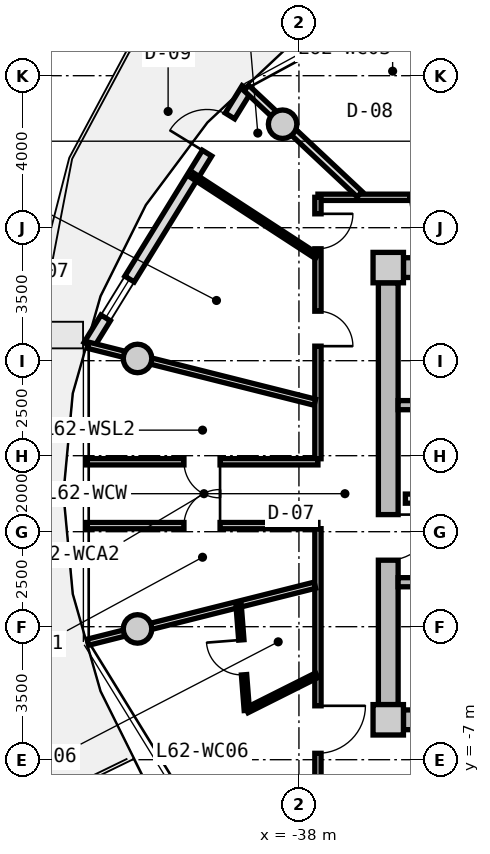
"""IFC4 building model, lengths in metres.
Left out: names, types, materials, properties, quantities, classifications, styles, units other than length and angle.
Written with IfcOpenShell. Run it as: python <this file> out.ifc"""

import sys

from ifc_helpers import new_model, si_unit, direction, frame, frame_2d, origin, origin_2d, place, context, subcontext, project, spatial, rectangle, circle, extrude, source, transform, mapped, element, fill, save


model = new_model("IFC4")
c1 = context("Model", 3, precision=1e-05, world=origin(), true_north=direction((0.0, 1.0)))
c2 = subcontext(c1, "Body", "Model", "MODEL_VIEW")
j1 = project(units=[si_unit("LENGTHUNIT", "METRE"), si_unit("PLANEANGLEUNIT", "RADIAN")], contexts=[c1])
p1 = place(None, origin())
s1 = spatial("IfcSite", under=j1, at=p1, CompositionType="ELEMENT")
p2 = place(p1, origin())
s2 = spatial("IfcBuilding", under=s1, at=p2, CompositionType="ELEMENT")
p3 = place(p2, frame((0.0, 0.0, 199.8)))
s3 = spatial("IfcBuildingStorey", under=s2, at=p3, CompositionType="ELEMENT", Elevation=199.8)
m1 = source(origin(), c2, "Body", "SweptSolid", [
    extrude(rectangle(XDim=0.8, YDim=0.8, at=origin_2d()), origin(), (0.0, 0.0, 1.0), 4.0),
])
for number, where, z_axis, x_axis in (
    (1, (-35.65, -5.95, 0.0), (0.0, 0.0, 1.0), (1.0, 0.0, 0.0)),
    (2, (-35.65, 5.95, 0.0), (0.0, 0.0, 1.0), (1.0, 0.0, 0.0)),
):
    element("IfcColumn", number, at=place(p3, frame(where, z_axis=z_axis, x_axis=x_axis)), inside=s3, PredefinedType="COLUMN", context=c2, shape_type="MappedRepresentation", body=[
        mapped(m1, transform((0.0, 0.0, 0.0), x_axis=(1.0, 0.0, 0.0), y_axis=(0.0, 1.0, 0.0), z_axis=(0.0, 0.0, 1.0), scale=1.0)),
    ])
m2 = source(origin(), c2, "Body", "SweptSolid", [
    extrude(rectangle(XDim=14.5, YDim=0.52, at=frame_2d((7.25, 0.0))), origin(), (0.0, 0.0, 1.0), 3.71),
])
for number, where, z_axis, x_axis in (
    (3, (-35.25, 5.95, 0.0), (0.0, 0.0, 1.0), (1.0, 0.0, 0.0)),
    (4, (-20.75, -5.95, 0.0), (0.0, 0.0, 1.0), (-1.0, 0.0, 0.0)),
):
    element("IfcWall", number, at=place(p3, frame(where, z_axis=z_axis, x_axis=x_axis)), inside=s3, PredefinedType="SHEAR", context=c2, shape_type="MappedRepresentation", body=[
        mapped(m2, transform((0.0, 0.0, 0.0), x_axis=(1.0, 0.0, 0.0), y_axis=(0.0, 1.0, 0.0), z_axis=(0.0, 0.0, 1.0), scale=1.0)),
    ])
m3 = source(origin(), c2, "Body", "SweptSolid", [
    extrude(rectangle(XDim=11.1, YDim=0.52, at=frame_2d((5.55, 0.0))), origin(), (0.0, 0.0, 1.0), 3.71),
])
p4 = place(p3, frame((-35.65, -5.55, 0.0), z_axis=(0.0, 0.0, 1.0), x_axis=(0.0, 1.0, 0.0)))
e5 = element("IfcWall", 5, at=p4, inside=s3, PredefinedType="SHEAR", context=c2, shape_type="MappedRepresentation", body=[
    mapped(m3, transform((0.0, 0.0, 0.0), x_axis=(1.0, 0.0, 0.0), y_axis=(0.0, 1.0, 0.0), z_axis=(0.0, 0.0, 1.0), scale=1.0)),
])
p5 = place(p4, frame((3.8, 0.0, 0.0)))
e6 = element("IfcOpeningElement", 6, at=p5, cuts=e5, PredefinedType="OPENING", context=c2, shape_type="SweptSolid", body=[
    extrude(rectangle(XDim=1.2, YDim=2.15, at=frame_2d((0.6, 1.075))), frame((0.0, 0.27, 0.0), z_axis=(0.0, -1.0, 0.0), x_axis=(1.0, 0.0, 0.0)), (0.0, 0.0, 1.0), 0.54),
])
m4 = source(origin(), c2, "Body", "SweptSolid", [
    extrude(circle(Radius=0.375, at=origin_2d()), origin(), (0.0, 0.0, 1.0), 4.0),
])
for number, where, z_axis, x_axis in (
    (7, (-38.43, 9.723, 0.0), (0.0, 0.0, 1.0), (1.0, 0.0, 0.0)),
    (8, (-42.247, 3.559, 0.0), (0.0, 0.0, 1.0), (1.0, 0.0, 0.0)),
    (9, (-42.247, -3.559, 0.0), (0.0, 0.0, 1.0), (1.0, 0.0, 0.0)),
):
    element("IfcColumn", number, at=place(p3, frame(where, z_axis=z_axis, x_axis=x_axis)), inside=s3, PredefinedType="COLUMN", context=c2, shape_type="MappedRepresentation", body=[
        mapped(m4, transform((0.0, 0.0, 0.0), x_axis=(1.0, 0.0, 0.0), y_axis=(0.0, 1.0, 0.0), z_axis=(0.0, 0.0, 1.0), scale=1.0)),
    ])
m5 = source(origin(), c2, "Body", "SweptSolid", [
    extrude(rectangle(XDim=7.938, YDim=0.29, at=frame_2d((3.969, 0.0))), origin(), (0.0, 0.0, 1.0), 3.71),
])
p6 = place(p3, frame((-43.532, 3.903, 0.0), z_axis=(0.0, 0.0, 1.0), x_axis=(0.524244987663, 0.851567491694, 0.0)))
e10 = element("IfcWall", 10, at=p6, inside=s3, PredefinedType="SOLIDWALL", context=c2, shape_type="MappedRepresentation", body=[
    mapped(m5, transform((0.0, 0.0, 0.0), x_axis=(1.0, 0.0, 0.0), y_axis=(0.0, 1.0, 0.0), z_axis=(0.0, 0.0, 1.0), scale=1.0)),
])
p7 = place(p6, frame((5.94, 0.0, 0.0)))
e11 = element("IfcOpeningElement", 11, at=p7, cuts=e10, PredefinedType="OPENING", context=c2, shape_type="SweptSolid", body=[
    extrude(rectangle(XDim=1.15, YDim=2.25, at=frame_2d((0.575, 1.125))), frame((0.0, 0.155, 0.0), z_axis=(0.0, -1.0, 0.0), x_axis=(1.0, 0.0, 0.0)), (0.0, 0.0, 1.0), 0.31),
])
p8 = place(p6, frame((0.85, 0.0, 0.85)))
e12 = element("IfcOpeningElement", 12, at=p8, cuts=e10, PredefinedType="OPENING", context=c2, shape_type="SweptSolid", body=[
    extrude(rectangle(XDim=1.2, YDim=1.5, at=frame_2d((0.6, 0.75))), frame((0.0, 0.155, 0.0), z_axis=(0.0, -1.0, 0.0), x_axis=(1.0, 0.0, 0.0)), (0.0, 0.0, 1.0), 0.31),
])
m6 = source(origin(), c2, "Body", "SweptSolid", [
    extrude(rectangle(XDim=7.93, YDim=0.24, at=frame_2d((3.965, 0.0))), origin(), (0.0, 0.0, 1.0), 3.71),
])
p9 = place(p3, frame((-35.39, 2.33, 0.0), z_axis=(0.0, 0.0, 1.0), x_axis=(1.0, 0.0, 0.0)))
e13 = element("IfcWall", 13, at=p9, inside=s3, PredefinedType="PARTITIONING", context=c2, shape_type="MappedRepresentation", body=[
    mapped(m6, transform((0.0, 0.0, 0.0), x_axis=(1.0, 0.0, 0.0), y_axis=(0.0, 1.0, 0.0), z_axis=(0.0, 0.0, 1.0), scale=1.0)),
])
p10 = place(p3, frame((-35.39, -2.33, 0.0), z_axis=(0.0, 0.0, 1.0), x_axis=(1.0, 0.0, 0.0)))
e14 = element("IfcWall", 14, at=p10, inside=s3, PredefinedType="PARTITIONING", context=c2, shape_type="MappedRepresentation", body=[
    mapped(m6, transform((0.0, 0.0, 0.0), x_axis=(1.0, 0.0, 0.0), y_axis=(0.0, 1.0, 0.0), z_axis=(0.0, 0.0, 1.0), scale=1.0)),
])
p11 = place(p10, frame((1.05, 0.0, 0.0)))
e15 = element("IfcOpeningElement", 15, at=p11, cuts=e14, PredefinedType="OPENING", context=c2, shape_type="SweptSolid", body=[
    extrude(rectangle(XDim=1.1, YDim=2.15, at=frame_2d((0.55, 1.075))), frame((0.0, 0.13, 0.0), z_axis=(0.0, -1.0, 0.0), x_axis=(1.0, 0.0, 0.0)), (0.0, 0.0, 1.0), 0.26),
])
m7 = source(origin(), c2, "Body", "SweptSolid", [
    extrude(rectangle(XDim=7.62, YDim=0.24, at=frame_2d((3.81, 0.0))), origin(), (0.0, 0.0, 1.0), 3.695),
])
p12 = place(p3, frame((-35.2, -0.13, 0.0), z_axis=(0.0, 0.0, 1.0), x_axis=(1.0, 0.0, 0.0)))
e16 = element("IfcWall", 16, at=p12, inside=s3, PredefinedType="PARTITIONING", context=c2, shape_type="MappedRepresentation", body=[
    mapped(m7, transform((0.0, 0.0, 0.0), x_axis=(1.0, 0.0, 0.0), y_axis=(0.0, 1.0, 0.0), z_axis=(0.0, 0.0, 1.0), scale=1.0)),
])
p13 = place(p12, frame((6.22, 0.0, 0.0)))
e17 = element("IfcOpeningElement", 17, at=p13, cuts=e16, PredefinedType="OPENING", context=c2, shape_type="SweptSolid", body=[
    extrude(rectangle(XDim=1.0, YDim=2.1, at=frame_2d((0.5, 1.05))), frame((0.0, 0.13, 0.0), z_axis=(0.0, -1.0, 0.0), x_axis=(1.0, 0.0, 0.0)), (0.0, 0.0, 1.0), 0.26),
])
p14 = place(p12, frame((2.4, 0.0, 0.0)))
e18 = element("IfcOpeningElement", 18, at=p14, cuts=e16, PredefinedType="OPENING", context=c2, shape_type="SweptSolid", body=[
    extrude(rectangle(XDim=1.0, YDim=2.1, at=frame_2d((0.5, 1.05))), frame((0.0, 0.13, 0.0), z_axis=(0.0, -1.0, 0.0), x_axis=(1.0, 0.0, 0.0)), (0.0, 0.0, 1.0), 0.26),
])
m8 = source(origin(), c2, "Body", "SweptSolid", [
    extrude(rectangle(XDim=8.58, YDim=0.165, at=frame_2d((4.29, 0.0))), origin(), (0.0, 0.0, 1.0), 3.695),
])
p15 = place(p3, frame((-37.5, 7.8, 0.0), z_axis=(0.0, 0.0, 1.0), x_axis=(1.0, 0.0, 0.0)))
e19 = element("IfcWall", 19, at=p15, inside=s3, PredefinedType="PARTITIONING", context=c2, shape_type="MappedRepresentation", body=[
    mapped(m8, transform((0.0, 0.0, 0.0), x_axis=(1.0, 0.0, 0.0), y_axis=(0.0, 1.0, 0.0), z_axis=(0.0, 0.0, 1.0), scale=1.0)),
])
p16 = place(p15, frame((2.415, 0.0, 0.0)))
e20 = element("IfcOpeningElement", 20, at=p16, cuts=e19, PredefinedType="OPENING", context=c2, shape_type="SweptSolid", body=[
    extrude(rectangle(XDim=1.25, YDim=2.2, at=frame_2d((0.625, 1.1))), frame((0.0, 0.093, 0.0), z_axis=(0.0, -1.0, 0.0), x_axis=(1.0, 0.0, 0.0)), (0.0, 0.0, 1.0), 0.185),
])
m9 = source(origin(), c2, "Body", "SweptSolid", [
    extrude(rectangle(XDim=6.88, YDim=0.165, at=frame_2d((3.44, 0.0))), origin(), (0.0, 0.0, 1.0), 3.695),
])
p17 = place(p3, frame((-37.5, -7.8, 0.0), z_axis=(0.0, 0.0, 1.0), x_axis=(0.0, 1.0, 0.0)))
e21 = element("IfcWall", 21, at=p17, inside=s3, PredefinedType="PARTITIONING", context=c2, shape_type="MappedRepresentation", body=[
    mapped(m9, transform((0.0, 0.0, 0.0), x_axis=(1.0, 0.0, 0.0), y_axis=(0.0, 1.0, 0.0), z_axis=(0.0, 0.0, 1.0), scale=1.0)),
])
p18 = place(p17, frame((0.968, 0.0, 0.0)))
e22 = element("IfcOpeningElement", 22, at=p18, cuts=e21, PredefinedType="OPENING", context=c2, shape_type="SweptSolid", body=[
    extrude(rectangle(XDim=1.25, YDim=2.2, at=frame_2d((0.625, 1.1))), frame((0.0, 0.093, 0.0), z_axis=(0.0, -1.0, 0.0), x_axis=(1.0, 0.0, 0.0)), (0.0, 0.0, 1.0), 0.185),
])
p19 = place(p3, frame((-37.5, 0.92, 0.0), z_axis=(0.0, 0.0, 1.0), x_axis=(0.0, 1.0, 0.0)))
e23 = element("IfcWall", 23, at=p19, inside=s3, PredefinedType="PARTITIONING", context=c2, shape_type="MappedRepresentation", body=[
    mapped(m9, transform((0.0, 0.0, 0.0), x_axis=(1.0, 0.0, 0.0), y_axis=(0.0, 1.0, 0.0), z_axis=(0.0, 0.0, 1.0), scale=1.0)),
])
p20 = place(p19, frame((5.525, 0.0, 0.0)))
e24 = element("IfcOpeningElement", 24, at=p20, cuts=e23, PredefinedType="OPENING", context=c2, shape_type="SweptSolid", body=[
    extrude(rectangle(XDim=0.92, YDim=2.1, at=frame_2d((0.46, 1.05))), frame((0.0, 0.093, 0.0), z_axis=(0.0, -1.0, 0.0), x_axis=(1.0, 0.0, 0.0)), (0.0, 0.0, 1.0), 0.185),
])
p21 = place(p19, frame((2.962, 0.0, 0.0)))
e25 = element("IfcOpeningElement", 25, at=p21, cuts=e23, PredefinedType="OPENING", context=c2, shape_type="SweptSolid", body=[
    extrude(rectangle(XDim=0.92, YDim=2.1, at=frame_2d((0.46, 1.05))), frame((0.0, 0.093, 0.0), z_axis=(0.0, -1.0, 0.0), x_axis=(1.0, 0.0, 0.0)), (0.0, 0.0, 1.0), 0.185),
])
m10 = source(origin(), c2, "Body", "SweptSolid", [
    extrude(rectangle(XDim=6.157, YDim=0.165, at=frame_2d((3.079, 0.0))), origin(), (0.0, 0.0, 1.0), 3.295),
])
for number, where, z_axis, x_axis in (
    (26, (-37.58, 2.407, 0.0), (0.0, 0.0, 1.0), (-0.97, 0.244, 0.0)),
    (27, (-37.58, -2.407, 0.0), (0.0, 0.0, 1.0), (-0.97, -0.244, 0.0)),
):
    element("IfcWall", number, at=place(p3, frame(where, z_axis=z_axis, x_axis=x_axis)), inside=s3, PredefinedType="PARTITIONING", context=c2, shape_type="MappedRepresentation", body=[
        mapped(m10, transform((0.0, 0.0, 0.0), x_axis=(1.0, 0.0, 0.0), y_axis=(0.0, 1.0, 0.0), z_axis=(0.0, 0.0, 1.0), scale=1.0)),
    ])
m11 = source(origin(), c2, "Body", "SweptSolid", [
    extrude(rectangle(XDim=6.101, YDim=0.165, at=frame_2d((3.051, 0.0))), origin(), (0.0, 0.0, 1.0), 3.695),
])
p22 = place(p3, frame((-43.601, 0.84, 0.0), z_axis=(0.0, 0.0, 1.0), x_axis=(1.0, 0.0, 0.0)))
e28 = element("IfcWall", 28, at=p22, inside=s3, PredefinedType="PARTITIONING", context=c2, shape_type="MappedRepresentation", body=[
    mapped(m11, transform((0.0, 0.0, 0.0), x_axis=(1.0, 0.0, 0.0), y_axis=(0.0, 1.0, 0.0), z_axis=(0.0, 0.0, 1.0), scale=1.0)),
])
p23 = place(p22, frame((2.576, 0.0, 0.0)))
e29 = element("IfcOpeningElement", 29, at=p23, cuts=e28, PredefinedType="OPENING", context=c2, shape_type="SweptSolid", body=[
    extrude(rectangle(XDim=0.95, YDim=2.1, at=frame_2d((0.475, 1.05))), frame((0.0, 0.093, 0.0), z_axis=(0.0, -1.0, 0.0), x_axis=(1.0, 0.0, 0.0)), (0.0, 0.0, 1.0), 0.185),
])
p24 = place(p3, frame((-37.5, -0.84, 0.0), z_axis=(0.0, 0.0, 1.0), x_axis=(-1.0, 0.0, 0.0)))
e30 = element("IfcWall", 30, at=p24, inside=s3, PredefinedType="PARTITIONING", context=c2, shape_type="MappedRepresentation", body=[
    mapped(m11, transform((0.0, 0.0, 0.0), x_axis=(1.0, 0.0, 0.0), y_axis=(0.0, 1.0, 0.0), z_axis=(0.0, 0.0, 1.0), scale=1.0)),
])
p25 = place(p24, frame((2.576, 0.0, 0.0)))
e31 = element("IfcOpeningElement", 31, at=p25, cuts=e30, PredefinedType="OPENING", context=c2, shape_type="SweptSolid", body=[
    extrude(rectangle(XDim=0.95, YDim=2.1, at=frame_2d((0.475, 1.05))), frame((0.0, 0.093, 0.0), z_axis=(0.0, -1.0, 0.0), x_axis=(1.0, 0.0, 0.0)), (0.0, 0.0, 1.0), 0.185),
])
m12 = source(origin(), c2, "Body", "SweptSolid", [
    extrude(rectangle(XDim=4.089, YDim=0.19, at=frame_2d((2.044, 0.0))), origin(), (0.0, 0.0, 1.0), 3.295),
])
p26 = place(p3, frame((-36.402, 7.88, 0.0), z_axis=(0.0, 0.0, 1.0), x_axis=(-0.729401273609, 0.684086092577, 0.0)))
e32 = element("IfcWall", 32, at=p26, inside=s3, PredefinedType="PARTITIONING", context=c2, shape_type="MappedRepresentation", body=[
    mapped(m12, transform((0.0, 0.0, 0.0), x_axis=(1.0, 0.0, 0.0), y_axis=(0.0, 1.0, 0.0), z_axis=(0.0, 0.0, 1.0), scale=1.0)),
])
m13 = source(origin(), c2, "Body", "SweptSolid", [
    extrude(rectangle(XDim=3.904, YDim=0.14, at=frame_2d((1.952, 0.0))), origin(), (0.0, 0.0, 1.0), 3.695),
])
p27 = place(p3, frame((-37.53, 6.246, 0.0), z_axis=(0.0, 0.0, 1.0), x_axis=(-0.838024687996, 0.545632314209, 0.0)))
e33 = element("IfcWall", 33, at=p27, inside=s3, PredefinedType="PARTITIONING", context=c2, shape_type="MappedRepresentation", body=[
    mapped(m13, transform((0.0, 0.0, 0.0), x_axis=(1.0, 0.0, 0.0), y_axis=(0.0, 1.0, 0.0), z_axis=(0.0, 0.0, 1.0), scale=1.0)),
])
m14 = source(origin(), c2, "Body", "SweptSolid", [
    extrude(rectangle(XDim=2.06, YDim=0.14, at=frame_2d((1.03, 0.0))), origin(), (0.0, 0.0, 1.0), 3.695),
])
p28 = place(p3, frame((-37.53, -4.778, 0.0), z_axis=(0.0, 0.0, 1.0), x_axis=(-0.893952568722, -0.448161583444, 0.0)))
e34 = element("IfcWall", 34, at=p28, inside=s3, PredefinedType="PARTITIONING", context=c2, shape_type="MappedRepresentation", body=[
    mapped(m14, transform((0.0, 0.0, 0.0), x_axis=(1.0, 0.0, 0.0), y_axis=(0.0, 1.0, 0.0), z_axis=(0.0, 0.0, 1.0), scale=1.0)),
])
m15 = source(origin(), c2, "Body", "SweptSolid", [
    extrude(rectangle(XDim=2.798, YDim=0.14, at=frame_2d((1.399, 0.0))), origin(), (0.0, 0.0, 1.0), 3.695),
])
p29 = place(p3, frame((-39.371, -5.701, 0.0), z_axis=(0.0, 0.0, 1.0), x_axis=(-0.077823984089, 0.996967114553, 0.0)))
e35 = element("IfcWall", 35, at=p29, inside=s3, PredefinedType="PARTITIONING", context=c2, shape_type="MappedRepresentation", body=[
    mapped(m15, transform((0.0, 0.0, 0.0), x_axis=(1.0, 0.0, 0.0), y_axis=(0.0, 1.0, 0.0), z_axis=(0.0, 0.0, 1.0), scale=1.0)),
])
p30 = place(p29, frame((0.939, 0.0, 0.0)))
e36 = element("IfcOpeningElement", 36, at=p30, cuts=e35, PredefinedType="OPENING", context=c2, shape_type="SweptSolid", body=[
    extrude(rectangle(XDim=0.92, YDim=2.1, at=frame_2d((0.46, 1.05))), frame((0.0, 0.08, 0.0), z_axis=(0.0, -1.0, 0.0), x_axis=(1.0, 0.0, 0.0)), (0.0, 0.0, 1.0), 0.16),
])
m16 = source(origin(), c2, "Body", "SweptSolid", [
    extrude(rectangle(XDim=1.15, YDim=2.25, at=frame_2d((0.575, 1.125))), frame((0.0, 0.025, 0.0), z_axis=(0.0, -1.0, 0.0), x_axis=(1.0, 0.0, 0.0)), (0.0, 0.0, 1.0), 0.05),
])
p31 = place(p7, origin())
e37 = element("IfcDoor", 37, at=p31, inside=s3, OperationType="SINGLE_SWING_LEFT", PredefinedType="DOOR", context=c2, shape_type="MappedRepresentation", body=[
    mapped(m16, transform((0.0, 0.0, 0.0), x_axis=(1.0, 0.0, 0.0), y_axis=(0.0, 1.0, 0.0), z_axis=(0.0, 0.0, 1.0), scale=1.0)),
])
fill(e11, e37)
m17 = source(origin(), c2, "Body", "SweptSolid", [
    extrude(rectangle(XDim=1.2, YDim=1.5, at=frame_2d((0.6, 0.75))), frame((0.0, 0.03, 0.0), z_axis=(0.0, -1.0, 0.0), x_axis=(1.0, 0.0, 0.0)), (0.0, 0.0, 1.0), 0.06),
])
p32 = place(p8, origin())
e38 = element("IfcWindow", 38, at=p32, inside=s3, PartitioningType="SINGLE_PANEL", PredefinedType="WINDOW", context=c2, shape_type="MappedRepresentation", body=[
    mapped(m17, transform((0.0, 0.0, 0.0), x_axis=(1.0, 0.0, 0.0), y_axis=(0.0, 1.0, 0.0), z_axis=(0.0, 0.0, 1.0), scale=1.0)),
])
fill(e12, e38)
m18 = source(origin(), c2, "Body", "SweptSolid", [
    extrude(rectangle(XDim=1.2, YDim=2.15, at=frame_2d((0.6, 1.075))), frame((0.0, 0.025, 0.0), z_axis=(0.0, -1.0, 0.0), x_axis=(1.0, 0.0, 0.0)), (0.0, 0.0, 1.0), 0.05),
])
p33 = place(p5, frame((1.2, 0.0, 0.0), z_axis=(0.0, 0.0, 1.0), x_axis=(-1.0, 0.0, 0.0)))
e39 = element("IfcDoor", 39, at=p33, inside=s3, OperationType="SINGLE_SWING_LEFT", PredefinedType="DOOR", context=c2, shape_type="MappedRepresentation", body=[
    mapped(m18, transform((0.0, 0.0, 0.0), x_axis=(1.0, 0.0, 0.0), y_axis=(0.0, 1.0, 0.0), z_axis=(0.0, 0.0, 1.0), scale=1.0)),
])
fill(e6, e39)
m19 = source(origin(), c2, "Body", "SweptSolid", [
    extrude(rectangle(XDim=0.95, YDim=2.1, at=frame_2d((0.475, 1.05))), frame((0.0, 0.025, 0.0), z_axis=(0.0, -1.0, 0.0), x_axis=(1.0, 0.0, 0.0)), (0.0, 0.0, 1.0), 0.05),
])
p34 = place(p25, frame((0.95, 0.0, 0.0), z_axis=(0.0, 0.0, 1.0), x_axis=(-1.0, 0.0, 0.0)))
e40 = element("IfcDoor", 40, at=p34, inside=s3, OperationType="SINGLE_SWING_RIGHT", PredefinedType="DOOR", context=c2, shape_type="MappedRepresentation", body=[
    mapped(m19, transform((0.0, 0.0, 0.0), x_axis=(1.0, 0.0, 0.0), y_axis=(0.0, 1.0, 0.0), z_axis=(0.0, 0.0, 1.0), scale=1.0)),
])
fill(e31, e40)
p35 = place(p23, frame((0.95, 0.0, 0.0), z_axis=(0.0, 0.0, 1.0), x_axis=(-1.0, 0.0, 0.0)))
e41 = element("IfcDoor", 41, at=p35, inside=s3, OperationType="SINGLE_SWING_LEFT", PredefinedType="DOOR", context=c2, shape_type="MappedRepresentation", body=[
    mapped(m19, transform((0.0, 0.0, 0.0), x_axis=(1.0, 0.0, 0.0), y_axis=(0.0, 1.0, 0.0), z_axis=(0.0, 0.0, 1.0), scale=1.0)),
])
fill(e29, e41)
m20 = source(origin(), c2, "Body", "SweptSolid", [
    extrude(rectangle(XDim=1.25, YDim=2.2, at=frame_2d((0.625, 1.1))), frame((0.0, 0.025, 0.0), z_axis=(0.0, -1.0, 0.0), x_axis=(1.0, 0.0, 0.0)), (0.0, 0.0, 1.0), 0.05),
])
p36 = place(p16, frame((1.25, 0.0, 0.0), z_axis=(0.0, 0.0, 1.0), x_axis=(-1.0, 0.0, 0.0)))
e42 = element("IfcDoor", 42, at=p36, inside=s3, OperationType="SINGLE_SWING_LEFT", PredefinedType="DOOR", context=c2, shape_type="MappedRepresentation", body=[
    mapped(m20, transform((0.0, 0.0, 0.0), x_axis=(1.0, 0.0, 0.0), y_axis=(0.0, 1.0, 0.0), z_axis=(0.0, 0.0, 1.0), scale=1.0)),
])
fill(e20, e42)
m21 = source(origin(), c2, "Body", "SweptSolid", [
    extrude(rectangle(XDim=0.92, YDim=2.1, at=frame_2d((0.46, 1.05))), frame((0.0, 0.025, 0.0), z_axis=(0.0, -1.0, 0.0), x_axis=(1.0, 0.0, 0.0)), (0.0, 0.0, 1.0), 0.05),
])
p37 = place(p20, frame((0.92, 0.0, 0.0), z_axis=(0.0, 0.0, 1.0), x_axis=(-1.0, 0.0, 0.0)))
e43 = element("IfcDoor", 43, at=p37, inside=s3, OperationType="SINGLE_SWING_LEFT", PredefinedType="DOOR", context=c2, shape_type="MappedRepresentation", body=[
    mapped(m21, transform((0.0, 0.0, 0.0), x_axis=(1.0, 0.0, 0.0), y_axis=(0.0, 1.0, 0.0), z_axis=(0.0, 0.0, 1.0), scale=1.0)),
])
fill(e24, e43)
p38 = place(p21, frame((0.92, 0.0, 0.0), z_axis=(0.0, 0.0, 1.0), x_axis=(-1.0, 0.0, 0.0)))
e44 = element("IfcDoor", 44, at=p38, inside=s3, OperationType="SINGLE_SWING_RIGHT", PredefinedType="DOOR", context=c2, shape_type="MappedRepresentation", body=[
    mapped(m21, transform((0.0, 0.0, 0.0), x_axis=(1.0, 0.0, 0.0), y_axis=(0.0, 1.0, 0.0), z_axis=(0.0, 0.0, 1.0), scale=1.0)),
])
fill(e25, e44)
p39 = place(p18, frame((1.25, 0.0, 0.0), z_axis=(0.0, 0.0, 1.0), x_axis=(-1.0, 0.0, 0.0)))
e45 = element("IfcDoor", 45, at=p39, inside=s3, OperationType="SINGLE_SWING_LEFT", PredefinedType="DOOR", context=c2, shape_type="MappedRepresentation", body=[
    mapped(m20, transform((0.0, 0.0, 0.0), x_axis=(1.0, 0.0, 0.0), y_axis=(0.0, 1.0, 0.0), z_axis=(0.0, 0.0, 1.0), scale=1.0)),
])
fill(e22, e45)
p40 = place(p30, origin())
e46 = element("IfcDoor", 46, at=p40, inside=s3, OperationType="SINGLE_SWING_RIGHT", PredefinedType="DOOR", context=c2, shape_type="MappedRepresentation", body=[
    mapped(m21, transform((0.0, 0.0, 0.0), x_axis=(1.0, 0.0, 0.0), y_axis=(0.0, 1.0, 0.0), z_axis=(0.0, 0.0, 1.0), scale=1.0)),
])
fill(e36, e46)
save(model, sys.argv[1])
